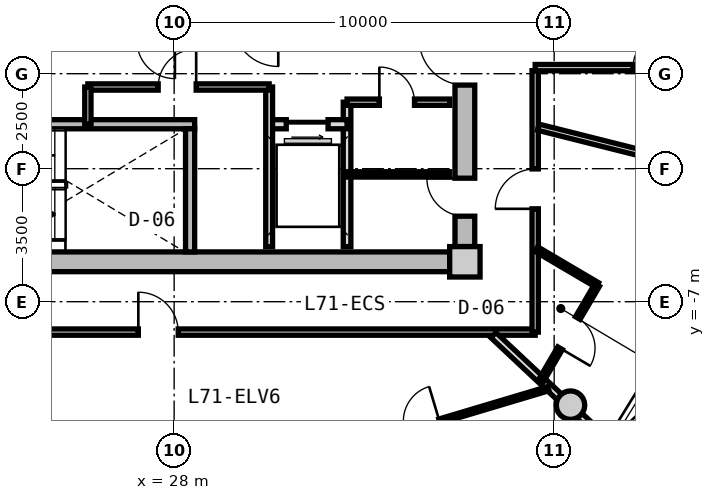
"""IFC4 building model, lengths in metres.
Left out: names, types, materials, properties, quantities, classifications, styles, units other than length and angle.
Written with IfcOpenShell. Run it as: python <this file> out.ifc"""

import sys

from ifc_helpers import new_model, si_unit, direction, frame, frame_2d, origin, origin_2d, place, context, subcontext, project, spatial, rectangle, circle, extrude, source, transform, mapped, element, fill, save


model = new_model("IFC4")
c1 = context("Model", 3, precision=1e-05, world=origin(), true_north=direction((0.0, 1.0)))
c2 = subcontext(c1, "Body", "Model", "MODEL_VIEW")
j1 = project(units=[si_unit("LENGTHUNIT", "METRE"), si_unit("PLANEANGLEUNIT", "RADIAN")], contexts=[c1])
p1 = place(None, origin())
s1 = spatial("IfcSite", under=j1, at=p1, CompositionType="ELEMENT")
p2 = place(p1, origin())
s2 = spatial("IfcBuilding", under=s1, at=p2, CompositionType="ELEMENT")
p3 = place(p2, frame((0.0, 0.0, 229.15)))
s3 = spatial("IfcBuildingStorey", under=s2, at=p3, CompositionType="ELEMENT", Elevation=229.15)
m1 = source(origin(), c2, "Body", "SweptSolid", [
    extrude(rectangle(XDim=0.8, YDim=0.8, at=origin_2d()), origin(), (0.0, 0.0, 1.0), 3.05),
])
p4 = place(p3, frame((35.65, -5.95, 0.0), z_axis=(0.0, 0.0, 1.0), x_axis=(1.0, 0.0, 0.0)))
e1 = element("IfcColumn", 1, at=p4, inside=s3, PredefinedType="COLUMN", context=c2, shape_type="MappedRepresentation", body=[
    mapped(m1, transform((0.0, 0.0, 0.0), x_axis=(1.0, 0.0, 0.0), y_axis=(0.0, 1.0, 0.0), z_axis=(0.0, 0.0, 1.0), scale=1.0)),
])
m2 = source(origin(), c2, "Body", "SweptSolid", [
    extrude(rectangle(XDim=14.5, YDim=0.52, at=frame_2d((7.25, 0.0))), origin(), (0.0, 0.0, 1.0), 2.81),
])
p5 = place(p3, frame((35.25, -5.95, 0.0), z_axis=(0.0, 0.0, 1.0), x_axis=(-1.0, 0.0, 0.0)))
e2 = element("IfcWall", 2, at=p5, inside=s3, PredefinedType="SHEAR", context=c2, shape_type="MappedRepresentation", body=[
    mapped(m2, transform((0.0, 0.0, 0.0), x_axis=(1.0, 0.0, 0.0), y_axis=(0.0, 1.0, 0.0), z_axis=(0.0, 0.0, 1.0), scale=1.0)),
])
m3 = source(origin(), c2, "Body", "SweptSolid", [
    extrude(rectangle(XDim=11.1, YDim=0.52, at=frame_2d((5.55, 0.0))), origin(), (0.0, 0.0, 1.0), 2.81),
])
p6 = place(p3, frame((35.65, 5.55, 0.0), z_axis=(0.0, 0.0, 1.0), x_axis=(0.0, -1.0, 0.0)))
e3 = element("IfcWall", 3, at=p6, inside=s3, PredefinedType="SHEAR", context=c2, shape_type="MappedRepresentation", body=[
    mapped(m3, transform((0.0, 0.0, 0.0), x_axis=(1.0, 0.0, 0.0), y_axis=(0.0, 1.0, 0.0), z_axis=(0.0, 0.0, 1.0), scale=1.0)),
])
p7 = place(p6, frame((5.65, 0.0, 0.0)))
e4 = element("IfcOpeningElement", 4, at=p7, cuts=e3, PredefinedType="OPENING", context=c2, shape_type="SweptSolid", body=[
    extrude(rectangle(XDim=1.2, YDim=2.15, at=frame_2d((0.6, 1.075))), frame((0.0, 0.27, 0.0), z_axis=(0.0, -1.0, 0.0), x_axis=(1.0, 0.0, 0.0)), (0.0, 0.0, 1.0), 0.54),
])
p8 = place(p6, frame((9.3, 0.0, 0.0)))
e5 = element("IfcOpeningElement", 5, at=p8, cuts=e3, PredefinedType="OPENING", context=c2, shape_type="SweptSolid", body=[
    extrude(rectangle(XDim=1.0, YDim=2.1, at=frame_2d((0.5, 1.05))), frame((0.0, 0.27, 0.0), z_axis=(0.0, -1.0, 0.0), x_axis=(1.0, 0.0, 0.0)), (0.0, 0.0, 1.0), 0.54),
])
m4 = source(origin(), c2, "Body", "SweptSolid", [
    extrude(circle(Radius=0.375, at=origin_2d()), origin(), (0.0, 0.0, 1.0), 3.05),
])
p9 = place(p3, frame((38.43, -9.723, 0.0), z_axis=(0.0, 0.0, 1.0), x_axis=(1.0, 0.0, 0.0)))
e6 = element("IfcColumn", 6, at=p9, inside=s3, PredefinedType="COLUMN", context=c2, shape_type="MappedRepresentation", body=[
    mapped(m4, transform((0.0, 0.0, 0.0), x_axis=(1.0, 0.0, 0.0), y_axis=(0.0, 1.0, 0.0), z_axis=(0.0, 0.0, 1.0), scale=1.0)),
])
m5 = source(origin(), c2, "Body", "SweptSolid", [
    extrude(rectangle(XDim=7.93, YDim=0.24, at=frame_2d((3.965, 0.0))), origin(), (0.0, 0.0, 1.0), 2.81),
])
p10 = place(p3, frame((20.61, -2.33, 0.0), z_axis=(0.0, 0.0, 1.0), x_axis=(1.0, 0.0, 0.0)))
e7 = element("IfcWall", 7, at=p10, inside=s3, PredefinedType="PARTITIONING", context=c2, shape_type="MappedRepresentation", body=[
    mapped(m5, transform((0.0, 0.0, 0.0), x_axis=(1.0, 0.0, 0.0), y_axis=(0.0, 1.0, 0.0), z_axis=(0.0, 0.0, 1.0), scale=1.0)),
])
p11 = place(p10, frame((1.05, 0.0, 0.0)))
e8 = element("IfcOpeningElement", 8, at=p11, cuts=e7, PredefinedType="OPENING", context=c2, shape_type="SweptSolid", body=[
    extrude(rectangle(XDim=1.1, YDim=2.15, at=frame_2d((0.55, 1.075))), frame((0.0, 0.13, 0.0), z_axis=(0.0, -1.0, 0.0), x_axis=(1.0, 0.0, 0.0)), (0.0, 0.0, 1.0), 0.26),
])
m6 = source(origin(), c2, "Body", "SweptSolid", [
    extrude(rectangle(XDim=3.24, YDim=0.24, at=frame_2d((1.62, 0.0))), origin(), (0.0, 0.0, 1.0), 2.81),
])
p12 = place(p3, frame((28.42, -5.69, 0.0), z_axis=(0.0, 0.0, 1.0), x_axis=(0.0, 1.0, 0.0)))
e9 = element("IfcWall", 9, at=p12, inside=s3, PredefinedType="PARTITIONING", context=c2, shape_type="MappedRepresentation", body=[
    mapped(m6, transform((0.0, 0.0, 0.0), x_axis=(1.0, 0.0, 0.0), y_axis=(0.0, 1.0, 0.0), z_axis=(0.0, 0.0, 1.0), scale=1.0)),
])
m7 = source(origin(), c2, "Body", "SweptSolid", [
    extrude(rectangle(XDim=3.8, YDim=0.2, at=frame_2d((1.9, 0.0))), origin(), (0.0, 0.0, 1.0), 2.795),
])
p13 = place(p3, frame((32.55, -5.55, 0.0), z_axis=(0.0, 0.0, 1.0), x_axis=(0.0, 1.0, 0.0)))
e10 = element("IfcWall", 10, at=p13, inside=s3, PredefinedType="PARTITIONING", context=c2, shape_type="MappedRepresentation", body=[
    mapped(m7, transform((0.0, 0.0, 0.0), x_axis=(1.0, 0.0, 0.0), y_axis=(0.0, 1.0, 0.0), z_axis=(0.0, 0.0, 1.0), scale=1.0)),
])
m8 = source(origin(), c2, "Body", "SweptSolid", [
    extrude(rectangle(XDim=2.05, YDim=0.24, at=frame_2d((1.025, 0.0))), origin(), (0.0, 0.0, 1.0), 2.795),
])
p14 = place(p3, frame((30.5, -2.33, 0.0), z_axis=(0.0, 0.0, 1.0), x_axis=(1.0, 0.0, 0.0)))
e11 = element("IfcWall", 11, at=p14, inside=s3, PredefinedType="PARTITIONING", context=c2, shape_type="MappedRepresentation", body=[
    mapped(m8, transform((0.0, 0.0, 0.0), x_axis=(1.0, 0.0, 0.0), y_axis=(0.0, 1.0, 0.0), z_axis=(0.0, 0.0, 1.0), scale=1.0)),
])
p15 = place(p14, frame((0.45, 0.0, 0.0)))
e12 = element("IfcOpeningElement", 12, at=p15, cuts=e11, PredefinedType="OPENING", context=c2, shape_type="SweptSolid", body=[
    extrude(rectangle(XDim=1.1, YDim=2.2, at=frame_2d((0.55, 1.1))), frame((0.0, 0.13, 0.0), z_axis=(0.0, -1.0, 0.0), x_axis=(1.0, 0.0, 0.0)), (0.0, 0.0, 1.0), 0.26),
])
m9 = source(origin(), c2, "Body", "SweptSolid", [
    extrude(rectangle(XDim=4.2, YDim=0.18, at=frame_2d((2.1, 0.0))), origin(), (0.0, 0.0, 1.0), 2.795),
])
p16 = place(p3, frame((30.5, -5.55, 0.0), z_axis=(0.0, 0.0, 1.0), x_axis=(0.0, 1.0, 0.0)))
e13 = element("IfcWall", 13, at=p16, inside=s3, PredefinedType="PARTITIONING", context=c2, shape_type="MappedRepresentation", body=[
    mapped(m9, transform((0.0, 0.0, 0.0), x_axis=(1.0, 0.0, 0.0), y_axis=(0.0, 1.0, 0.0), z_axis=(0.0, 0.0, 1.0), scale=1.0)),
])
m10 = source(origin(), c2, "Body", "SweptSolid", [
    extrude(rectangle(XDim=4.77, YDim=0.165, at=frame_2d((2.385, 0.0))), origin(), (0.0, 0.0, 1.0), 2.795),
])
p17 = place(p3, frame((25.73, -1.35, 0.0), z_axis=(0.0, 0.0, 1.0), x_axis=(1.0, 0.0, 0.0)))
e14 = element("IfcWall", 14, at=p17, inside=s3, PredefinedType="PARTITIONING", context=c2, shape_type="MappedRepresentation", body=[
    mapped(m10, transform((0.0, 0.0, 0.0), x_axis=(1.0, 0.0, 0.0), y_axis=(0.0, 1.0, 0.0), z_axis=(0.0, 0.0, 1.0), scale=1.0)),
])
p18 = place(p17, frame((1.85, 0.0, 0.0)))
e15 = element("IfcOpeningElement", 15, at=p18, cuts=e14, PredefinedType="OPENING", context=c2, shape_type="SweptSolid", body=[
    extrude(rectangle(XDim=1.0, YDim=2.1, at=frame_2d((0.5, 1.05))), frame((0.0, 0.093, 0.0), z_axis=(0.0, -1.0, 0.0), x_axis=(1.0, 0.0, 0.0)), (0.0, 0.0, 1.0), 0.185),
])
m11 = source(origin(), c2, "Body", "SweptSolid", [
    extrude(rectangle(XDim=0.98, YDim=0.165, at=frame_2d((0.49, 0.0))), origin(), (0.0, 0.0, 1.0), 2.795),
])
p19 = place(p3, frame((25.73, -2.33, 0.0), z_axis=(0.0, 0.0, 1.0), x_axis=(0.0, 1.0, 0.0)))
e16 = element("IfcWall", 16, at=p19, inside=s3, PredefinedType="PARTITIONING", context=c2, shape_type="MappedRepresentation", body=[
    mapped(m11, transform((0.0, 0.0, 0.0), x_axis=(1.0, 0.0, 0.0), y_axis=(0.0, 1.0, 0.0), z_axis=(0.0, 0.0, 1.0), scale=1.0)),
])
m12 = source(origin(), c2, "Body", "SweptSolid", [
    extrude(rectangle(XDim=2.7, YDim=0.165, at=frame_2d((1.35, 0.0))), origin(), (0.0, 0.0, 1.0), 2.795),
])
p20 = place(p3, frame((32.55, -1.75, 0.0), z_axis=(0.0, 0.0, 1.0), x_axis=(1.0, 0.0, 0.0)))
e17 = element("IfcWall", 17, at=p20, inside=s3, PredefinedType="PARTITIONING", context=c2, shape_type="MappedRepresentation", body=[
    mapped(m12, transform((0.0, 0.0, 0.0), x_axis=(1.0, 0.0, 0.0), y_axis=(0.0, 1.0, 0.0), z_axis=(0.0, 0.0, 1.0), scale=1.0)),
])
p21 = place(p20, frame((0.85, 0.0, 0.0)))
e18 = element("IfcOpeningElement", 18, at=p21, cuts=e17, PredefinedType="OPENING", context=c2, shape_type="SweptSolid", body=[
    extrude(rectangle(XDim=0.925, YDim=2.1, at=frame_2d((0.462, 1.05))), frame((0.0, 0.093, 0.0), z_axis=(0.0, -1.0, 0.0), x_axis=(1.0, 0.0, 0.0)), (0.0, 0.0, 1.0), 0.185),
])
m13 = source(origin(), c2, "Body", "SweptSolid", [
    extrude(rectangle(XDim=2.7, YDim=0.14, at=frame_2d((1.35, 0.0))), origin(), (0.0, 0.0, 1.0), 2.795),
])
p22 = place(p3, frame((32.55, -3.65, 0.0), z_axis=(0.0, 0.0, 1.0), x_axis=(1.0, 0.0, 0.0)))
e19 = element("IfcWall", 19, at=p22, inside=s3, PredefinedType="PARTITIONING", context=c2, shape_type="MappedRepresentation", body=[
    mapped(m13, transform((0.0, 0.0, 0.0), x_axis=(1.0, 0.0, 0.0), y_axis=(0.0, 1.0, 0.0), z_axis=(0.0, 0.0, 1.0), scale=1.0)),
])
m14 = source(origin(), c2, "Body", "SweptSolid", [
    extrude(rectangle(XDim=19.0, YDim=0.165, at=frame_2d((9.5, 0.0))), origin(), (0.0, 0.0, 1.0), 2.795),
])
p23 = place(p3, frame((37.5, -7.8, 0.0), z_axis=(0.0, 0.0, 1.0), x_axis=(-1.0, 0.0, 0.0)))
e20 = element("IfcWall", 20, at=p23, inside=s3, PredefinedType="PARTITIONING", context=c2, shape_type="MappedRepresentation", body=[
    mapped(m14, transform((0.0, 0.0, 0.0), x_axis=(1.0, 0.0, 0.0), y_axis=(0.0, 1.0, 0.0), z_axis=(0.0, 0.0, 1.0), scale=1.0)),
])
p24 = place(p23, frame((9.392, 0.0, 0.0)))
e21 = element("IfcOpeningElement", 21, at=p24, cuts=e20, PredefinedType="OPENING", context=c2, shape_type="SweptSolid", body=[
    extrude(rectangle(XDim=1.05, YDim=2.15, at=frame_2d((0.525, 1.075))), frame((0.0, 0.093, 0.0), z_axis=(0.0, -1.0, 0.0), x_axis=(1.0, 0.0, 0.0)), (0.0, 0.0, 1.0), 0.185),
])
m15 = source(origin(), c2, "Body", "SweptSolid", [
    extrude(rectangle(XDim=6.88, YDim=0.165, at=frame_2d((3.44, 0.0))), origin(), (0.0, 0.0, 1.0), 2.795),
])
p25 = place(p3, frame((37.5, -0.92, 0.0), z_axis=(0.0, 0.0, 1.0), x_axis=(0.0, -1.0, 0.0)))
e22 = element("IfcWall", 22, at=p25, inside=s3, PredefinedType="PARTITIONING", context=c2, shape_type="MappedRepresentation", body=[
    mapped(m15, transform((0.0, 0.0, 0.0), x_axis=(1.0, 0.0, 0.0), y_axis=(0.0, 1.0, 0.0), z_axis=(0.0, 0.0, 1.0), scale=1.0)),
])
p26 = place(p25, frame((2.586, 0.0, 0.0)))
e23 = element("IfcOpeningElement", 23, at=p26, cuts=e22, PredefinedType="OPENING", context=c2, shape_type="SweptSolid", body=[
    extrude(rectangle(XDim=1.05, YDim=2.15, at=frame_2d((0.525, 1.075))), frame((0.0, 0.093, 0.0), z_axis=(0.0, -1.0, 0.0), x_axis=(1.0, 0.0, 0.0)), (0.0, 0.0, 1.0), 0.185),
])
m16 = source(origin(), c2, "Body", "SweptSolid", [
    extrude(rectangle(XDim=6.157, YDim=0.165, at=frame_2d((3.079, 0.0))), origin(), (0.0, 0.0, 1.0), 2.395),
])
p27 = place(p3, frame((37.58, -2.407, 0.0), z_axis=(0.0, 0.0, 1.0), x_axis=(0.969840867184, -0.243738984038, 0.0)))
e24 = element("IfcWall", 24, at=p27, inside=s3, PredefinedType="PARTITIONING", context=c2, shape_type="MappedRepresentation", body=[
    mapped(m16, transform((0.0, 0.0, 0.0), x_axis=(1.0, 0.0, 0.0), y_axis=(0.0, 1.0, 0.0), z_axis=(0.0, 0.0, 1.0), scale=1.0)),
])
m17 = source(origin(), c2, "Body", "SweptSolid", [
    extrude(rectangle(XDim=6.101, YDim=0.165, at=frame_2d((3.051, 0.0))), origin(), (0.0, 0.0, 1.0), 2.795),
])
p28 = place(p3, frame((43.601, -0.84, 0.0), z_axis=(0.0, 0.0, 1.0), x_axis=(-1.0, 0.0, 0.0)))
e25 = element("IfcWall", 25, at=p28, inside=s3, PredefinedType="PARTITIONING", context=c2, shape_type="MappedRepresentation", body=[
    mapped(m17, transform((0.0, 0.0, 0.0), x_axis=(1.0, 0.0, 0.0), y_axis=(0.0, 1.0, 0.0), z_axis=(0.0, 0.0, 1.0), scale=1.0)),
])
p29 = place(p28, frame((2.576, 0.0, 0.0)))
e26 = element("IfcOpeningElement", 26, at=p29, cuts=e25, PredefinedType="OPENING", context=c2, shape_type="SweptSolid", body=[
    extrude(rectangle(XDim=0.95, YDim=2.1, at=frame_2d((0.475, 1.05))), frame((0.0, 0.093, 0.0), z_axis=(0.0, -1.0, 0.0), x_axis=(1.0, 0.0, 0.0)), (0.0, 0.0, 1.0), 0.185),
])
m18 = source(origin(), c2, "Body", "SweptSolid", [
    extrude(rectangle(XDim=4.089, YDim=0.19, at=frame_2d((2.044, 0.0))), origin(), (0.0, 0.0, 1.0), 2.395),
])
p30 = place(p3, frame((36.402, -7.88, 0.0), z_axis=(0.0, 0.0, 1.0), x_axis=(0.729401273609, -0.684086092577, 0.0)))
e27 = element("IfcWall", 27, at=p30, inside=s3, PredefinedType="PARTITIONING", context=c2, shape_type="MappedRepresentation", body=[
    mapped(m18, transform((0.0, 0.0, 0.0), x_axis=(1.0, 0.0, 0.0), y_axis=(0.0, 1.0, 0.0), z_axis=(0.0, 0.0, 1.0), scale=1.0)),
])
m19 = source(origin(), c2, "Body", "SweptSolid", [
    extrude(rectangle(XDim=6.936, YDim=0.115, at=frame_2d((3.468, 0.0))), origin(), (0.0, 0.0, 1.0), 2.795),
])
p31 = place(p3, frame((18.151, -9.287, 0.0), z_axis=(0.0, 0.0, 1.0), x_axis=(0.958186895835, -0.286143098205, 0.0)))
e28 = element("IfcWall", 28, at=p31, inside=s3, PredefinedType="PARTITIONING", context=c2, shape_type="MappedRepresentation", body=[
    mapped(m19, transform((0.0, 0.0, 0.0), x_axis=(1.0, 0.0, 0.0), y_axis=(0.0, 1.0, 0.0), z_axis=(0.0, 0.0, 1.0), scale=1.0)),
])
p32 = place(p31, frame((2.993, 0.0, 0.0)))
e29 = element("IfcOpeningElement", 29, at=p32, cuts=e28, PredefinedType="OPENING", context=c2, shape_type="SweptSolid", body=[
    extrude(rectangle(XDim=0.95, YDim=2.1, at=frame_2d((0.475, 1.05))), frame((0.0, 0.067, 0.0), z_axis=(0.0, -1.0, 0.0), x_axis=(1.0, 0.0, 0.0)), (0.0, 0.0, 1.0), 0.135),
])
p33 = place(p3, frame((31.203, -11.272, 0.0), z_axis=(0.0, 0.0, 1.0), x_axis=(0.958186895835, 0.286143098205, 0.0)))
e30 = element("IfcWall", 30, at=p33, inside=s3, PredefinedType="PARTITIONING", context=c2, shape_type="MappedRepresentation", body=[
    mapped(m19, transform((0.0, 0.0, 0.0), x_axis=(1.0, 0.0, 0.0), y_axis=(0.0, 1.0, 0.0), z_axis=(0.0, 0.0, 1.0), scale=1.0)),
])
p34 = place(p33, frame((2.993, 0.0, 0.0)))
e31 = element("IfcOpeningElement", 31, at=p34, cuts=e30, PredefinedType="OPENING", context=c2, shape_type="SweptSolid", body=[
    extrude(rectangle(XDim=0.95, YDim=2.1, at=frame_2d((0.475, 1.05))), frame((0.0, 0.067, 0.0), z_axis=(0.0, -1.0, 0.0), x_axis=(1.0, 0.0, 0.0)), (0.0, 0.0, 1.0), 0.135),
])
m20 = source(origin(), c2, "Body", "SweptSolid", [
    extrude(rectangle(XDim=1.859, YDim=0.14, at=frame_2d((0.93, 0.0))), origin(), (0.0, 0.0, 1.0), 2.795),
])
p35 = place(p3, frame((37.53, -5.615, 0.0), z_axis=(0.0, 0.0, 1.0), x_axis=(0.861555897139, -0.507662718845, 0.0)))
e32 = element("IfcWall", 32, at=p35, inside=s3, PredefinedType="PARTITIONING", context=c2, shape_type="MappedRepresentation", body=[
    mapped(m20, transform((0.0, 0.0, 0.0), x_axis=(1.0, 0.0, 0.0), y_axis=(0.0, 1.0, 0.0), z_axis=(0.0, 0.0, 1.0), scale=1.0)),
])
m21 = source(origin(), c2, "Body", "SweptSolid", [
    extrude(rectangle(XDim=2.939, YDim=0.14, at=frame_2d((1.47, 0.0))), origin(), (0.0, 0.0, 1.0), 2.795),
])
p36 = place(p3, frame((39.132, -6.559, 0.0), z_axis=(0.0, 0.0, 1.0), x_axis=(-0.505883614636, -0.862601743821, 0.0)))
e33 = element("IfcWall", 33, at=p36, inside=s3, PredefinedType="PARTITIONING", context=c2, shape_type="MappedRepresentation", body=[
    mapped(m21, transform((0.0, 0.0, 0.0), x_axis=(1.0, 0.0, 0.0), y_axis=(0.0, 1.0, 0.0), z_axis=(0.0, 0.0, 1.0), scale=1.0)),
])
p37 = place(p36, frame((1.01, 0.0, 0.0)))
e34 = element("IfcOpeningElement", 34, at=p37, cuts=e33, PredefinedType="OPENING", context=c2, shape_type="SweptSolid", body=[
    extrude(rectangle(XDim=0.92, YDim=2.1, at=frame_2d((0.46, 1.05))), frame((0.0, 0.08, 0.0), z_axis=(0.0, -1.0, 0.0), x_axis=(1.0, 0.0, 0.0)), (0.0, 0.0, 1.0), 0.16),
])
m22 = source(origin(), c2, "Body", "SweptSolid", [
    extrude(rectangle(XDim=1.2, YDim=2.15, at=frame_2d((0.6, 1.075))), frame((0.0, 0.025, 0.0), z_axis=(0.0, -1.0, 0.0), x_axis=(1.0, 0.0, 0.0)), (0.0, 0.0, 1.0), 0.05),
])
p38 = place(p7, frame((1.2, 0.0, 0.0), z_axis=(0.0, 0.0, 1.0), x_axis=(-1.0, 0.0, 0.0)))
e35 = element("IfcDoor", 35, at=p38, inside=s3, OperationType="SINGLE_SWING_RIGHT", PredefinedType="DOOR", context=c2, shape_type="MappedRepresentation", body=[
    mapped(m22, transform((0.0, 0.0, 0.0), x_axis=(1.0, 0.0, 0.0), y_axis=(0.0, 1.0, 0.0), z_axis=(0.0, 0.0, 1.0), scale=1.0)),
])
fill(e4, e35)
m23 = source(origin(), c2, "Body", "SweptSolid", [
    extrude(rectangle(XDim=1.1, YDim=2.2, at=frame_2d((0.55, 1.1))), frame((0.0, 0.025, 0.0), z_axis=(0.0, -1.0, 0.0), x_axis=(1.0, 0.0, 0.0)), (0.0, 0.0, 1.0), 0.05),
])
p39 = place(p15, frame((1.1, 0.0, 0.0), z_axis=(0.0, 0.0, 1.0), x_axis=(-1.0, 0.0, 0.0)))
e36 = element("IfcDoor", 36, at=p39, inside=s3, OperationType="SLIDING_TO_RIGHT", PredefinedType="DOOR", context=c2, shape_type="MappedRepresentation", body=[
    mapped(m23, transform((0.0, 0.0, 0.0), x_axis=(1.0, 0.0, 0.0), y_axis=(0.0, 1.0, 0.0), z_axis=(0.0, 0.0, 1.0), scale=1.0)),
])
fill(e12, e36)
m24 = source(origin(), c2, "Body", "SweptSolid", [
    extrude(rectangle(XDim=1.0, YDim=2.1, at=frame_2d((0.5, 1.05))), frame((0.0, 0.025, 0.0), z_axis=(0.0, -1.0, 0.0), x_axis=(1.0, 0.0, 0.0)), (0.0, 0.0, 1.0), 0.05),
])
p40 = place(p18, origin())
e37 = element("IfcDoor", 37, at=p40, inside=s3, OperationType="SINGLE_SWING_RIGHT", PredefinedType="DOOR", context=c2, shape_type="MappedRepresentation", body=[
    mapped(m24, transform((0.0, 0.0, 0.0), x_axis=(1.0, 0.0, 0.0), y_axis=(0.0, 1.0, 0.0), z_axis=(0.0, 0.0, 1.0), scale=1.0)),
])
fill(e15, e37)
m25 = source(origin(), c2, "Body", "SweptSolid", [
    extrude(rectangle(XDim=0.925, YDim=2.1, at=frame_2d((0.462, 1.05))), frame((0.0, 0.025, 0.0), z_axis=(0.0, -1.0, 0.0), x_axis=(1.0, 0.0, 0.0)), (0.0, 0.0, 1.0), 0.05),
])
p41 = place(p21, origin())
e38 = element("IfcDoor", 38, at=p41, inside=s3, OperationType="SINGLE_SWING_LEFT", PredefinedType="DOOR", context=c2, shape_type="MappedRepresentation", body=[
    mapped(m25, transform((0.0, 0.0, 0.0), x_axis=(1.0, 0.0, 0.0), y_axis=(0.0, 1.0, 0.0), z_axis=(0.0, 0.0, 1.0), scale=1.0)),
])
fill(e18, e38)
p42 = place(p8, frame((1.0, 0.0, 0.0), z_axis=(0.0, 0.0, 1.0), x_axis=(-1.0, 0.0, 0.0)))
e39 = element("IfcDoor", 39, at=p42, inside=s3, OperationType="SINGLE_SWING_RIGHT", PredefinedType="DOOR", context=c2, shape_type="MappedRepresentation", body=[
    mapped(m24, transform((0.0, 0.0, 0.0), x_axis=(1.0, 0.0, 0.0), y_axis=(0.0, 1.0, 0.0), z_axis=(0.0, 0.0, 1.0), scale=1.0)),
])
fill(e5, e39)
m26 = source(origin(), c2, "Body", "SweptSolid", [
    extrude(rectangle(XDim=0.95, YDim=2.1, at=frame_2d((0.475, 1.05))), frame((0.0, 0.025, 0.0), z_axis=(0.0, -1.0, 0.0), x_axis=(1.0, 0.0, 0.0)), (0.0, 0.0, 1.0), 0.05),
])
p43 = place(p29, frame((0.95, 0.0, 0.0), z_axis=(0.0, 0.0, 1.0), x_axis=(-1.0, 0.0, 0.0)))
e40 = element("IfcDoor", 40, at=p43, inside=s3, OperationType="SINGLE_SWING_RIGHT", PredefinedType="DOOR", context=c2, shape_type="MappedRepresentation", body=[
    mapped(m26, transform((0.0, 0.0, 0.0), x_axis=(1.0, 0.0, 0.0), y_axis=(0.0, 1.0, 0.0), z_axis=(0.0, 0.0, 1.0), scale=1.0)),
])
fill(e26, e40)
m27 = source(origin(), c2, "Body", "SweptSolid", [
    extrude(rectangle(XDim=1.05, YDim=2.15, at=frame_2d((0.525, 1.075))), frame((0.0, 0.025, 0.0), z_axis=(0.0, -1.0, 0.0), x_axis=(1.0, 0.0, 0.0)), (0.0, 0.0, 1.0), 0.05),
])
p44 = place(p24, frame((1.05, 0.0, 0.0), z_axis=(0.0, 0.0, 1.0), x_axis=(-1.0, 0.0, 0.0)))
e41 = element("IfcDoor", 41, at=p44, inside=s3, OperationType="SINGLE_SWING_LEFT", PredefinedType="DOOR", context=c2, shape_type="MappedRepresentation", body=[
    mapped(m27, transform((0.0, 0.0, 0.0), x_axis=(1.0, 0.0, 0.0), y_axis=(0.0, 1.0, 0.0), z_axis=(0.0, 0.0, 1.0), scale=1.0)),
])
fill(e21, e41)
p45 = place(p26, frame((1.05, 0.0, 0.0), z_axis=(0.0, 0.0, 1.0), x_axis=(-1.0, 0.0, 0.0)))
e42 = element("IfcDoor", 42, at=p45, inside=s3, OperationType="SINGLE_SWING_LEFT", PredefinedType="DOOR", context=c2, shape_type="MappedRepresentation", body=[
    mapped(m27, transform((0.0, 0.0, 0.0), x_axis=(1.0, 0.0, 0.0), y_axis=(0.0, 1.0, 0.0), z_axis=(0.0, 0.0, 1.0), scale=1.0)),
])
fill(e23, e42)
m28 = source(origin(), c2, "Body", "SweptSolid", [
    extrude(rectangle(XDim=0.92, YDim=2.1, at=frame_2d((0.46, 1.05))), frame((0.0, 0.025, 0.0), z_axis=(0.0, -1.0, 0.0), x_axis=(1.0, 0.0, 0.0)), (0.0, 0.0, 1.0), 0.05),
])
p46 = place(p37, origin())
e43 = element("IfcDoor", 43, at=p46, inside=s3, OperationType="SINGLE_SWING_RIGHT", PredefinedType="DOOR", context=c2, shape_type="MappedRepresentation", body=[
    mapped(m28, transform((0.0, 0.0, 0.0), x_axis=(1.0, 0.0, 0.0), y_axis=(0.0, 1.0, 0.0), z_axis=(0.0, 0.0, 1.0), scale=1.0)),
])
fill(e34, e43)
save(model, sys.argv[1])
